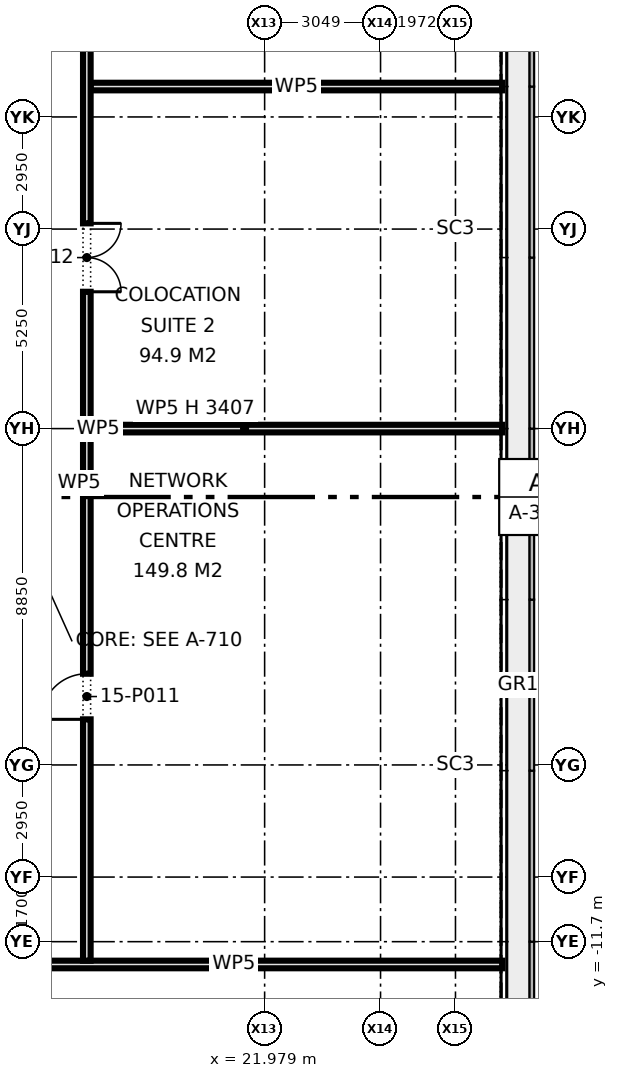
"""IFC4 building model, lengths in metres.
Left out: names, types, materials, properties, quantities, classifications, styles, units other than length and angle.
Written with IfcOpenShell. Run it as: python <this file> out.ifc"""

import sys

from ifc_helpers import new_model, si_unit, direction, frame, frame_2d, origin, origin_2d, place, context, subcontext, project, spatial, rectangle, i_section, extrude, element, fill, save


model = new_model("IFC4")
c1 = context("Model", 3, precision=1e-05, world=origin(), true_north=direction((0.0, 1.0)))
c2 = subcontext(c1, "Body", "Model", "MODEL_VIEW")
j1 = project(units=[si_unit("LENGTHUNIT", "METRE"), si_unit("PLANEANGLEUNIT", "RADIAN")], contexts=[c1])
p1 = place(None, origin())
s1 = spatial("IfcSite", under=j1, at=p1, CompositionType="ELEMENT")
p2 = place(p1, origin())
s2 = spatial("IfcBuilding", under=s1, at=p2, CompositionType="ELEMENT")
p3 = place(p2, frame((0.0, 0.0, 68.6)))
s3 = spatial("IfcBuildingStorey", under=s2, at=p3, CompositionType="ELEMENT", Elevation=68.6)
for number, where, z_axis, x_axis in (
    (1, (27.0, -7.05, 0.0), (0.0, 0.0, 1.0), (0.0, 1.0, 0.0)),
    (2, (27.0, 7.05, 0.0), (0.0, 0.0, 1.0), (0.0, 1.0, 0.0)),
):
    element("IfcColumn", number, at=place(p3, frame(where, z_axis=z_axis, x_axis=x_axis)), inside=s3, PredefinedType="COLUMN", context=c2, shape_type="SweptSolid", body=[
        extrude(i_section(OverallWidth=0.442, OverallDepth=0.531, WebThickness=0.066, FlangeThickness=0.106, FilletRadius=0.015, at=origin_2d()), origin(), (0.0, 0.0, 1.0), 3.407),
    ])
p4 = place(p3, frame((-20.33, -12.3, 0.0), z_axis=(0.0, 0.0, 1.0), x_axis=(1.0, 0.0, 0.0)))
e3 = element("IfcWall", 3, at=p4, inside=s3, PredefinedType="PARTITIONING", context=c2, shape_type="SweptSolid", body=[
    extrude(rectangle(XDim=48.56, YDim=0.2, at=frame_2d((24.28, 0.0))), origin(), (0.0, 0.0, 1.0), 4.4),
])
p5 = place(p4, frame((5.64, 0.0, 0.0)))
e4 = element("IfcOpeningElement", 4, at=p5, cuts=e3, PredefinedType="OPENING", context=c2, shape_type="SweptSolid", body=[
    extrude(rectangle(XDim=1.8, YDim=2.1, at=frame_2d((0.9, 1.05))), frame((0.0, 0.11, 0.0), z_axis=(0.0, -1.0, 0.0), x_axis=(1.0, 0.0, 0.0)), (0.0, 0.0, 1.0), 0.22),
])
p6 = place(p4, frame((16.93, 0.0, 0.0)))
e5 = element("IfcOpeningElement", 5, at=p6, cuts=e3, PredefinedType="OPENING", context=c2, shape_type="SweptSolid", body=[
    extrude(rectangle(XDim=1.2, YDim=2.1, at=frame_2d((0.6, 1.05))), frame((0.0, 0.11, 0.0), z_axis=(0.0, -1.0, 0.0), x_axis=(1.0, 0.0, 0.0)), (0.0, 0.0, 1.0), 0.22),
])
p7 = place(p4, frame((33.035, 0.0, 0.0)))
e6 = element("IfcOpeningElement", 6, at=p7, cuts=e3, PredefinedType="OPENING", context=c2, shape_type="SweptSolid", body=[
    extrude(rectangle(XDim=1.8, YDim=2.1, at=frame_2d((0.9, 1.05))), frame((0.0, 0.11, 0.0), z_axis=(0.0, -1.0, 0.0), x_axis=(1.0, 0.0, 0.0)), (0.0, 0.0, 1.0), 0.22),
])
p8 = place(p4, frame((23.03, 0.0, 0.0)))
e7 = element("IfcOpeningElement", 7, at=p8, cuts=e3, PredefinedType="OPENING", context=c2, shape_type="SweptSolid", body=[
    extrude(rectangle(XDim=1.0, YDim=2.1, at=frame_2d((0.5, 1.05))), frame((0.0, 0.11, 0.0), z_axis=(0.0, -1.0, 0.0), x_axis=(1.0, 0.0, 0.0)), (0.0, 0.0, 1.0), 0.22),
])
p9 = place(p4, frame((26.03, 0.0, 0.0)))
e8 = element("IfcOpeningElement", 8, at=p9, cuts=e3, PredefinedType="OPENING", context=c2, shape_type="SweptSolid", body=[
    extrude(rectangle(XDim=1.0, YDim=2.1, at=frame_2d((0.5, 1.05))), frame((0.0, 0.11, 0.0), z_axis=(0.0, -1.0, 0.0), x_axis=(1.0, 0.0, 0.0)), (0.0, 0.0, 1.0), 0.22),
])
p10 = place(p4, frame((28.63, 0.0, 0.0)))
e9 = element("IfcOpeningElement", 9, at=p10, cuts=e3, PredefinedType="OPENING", context=c2, shape_type="SweptSolid", body=[
    extrude(rectangle(XDim=1.0, YDim=2.1, at=frame_2d((0.5, 1.05))), frame((0.0, 0.11, 0.0), z_axis=(0.0, -1.0, 0.0), x_axis=(1.0, 0.0, 0.0)), (0.0, 0.0, 1.0), 0.22),
])
p11 = place(p3, frame((17.4, 1.8, 0.0), z_axis=(0.0, 0.0, 1.0), x_axis=(1.0, 0.0, 0.0)))
e10 = element("IfcWall", 10, at=p11, inside=s3, PredefinedType="PARTITIONING", context=c2, shape_type="SweptSolid", body=[
    extrude(rectangle(XDim=0.4, YDim=0.2, at=frame_2d((0.2, 0.0))), origin(), (0.0, 0.0, 1.0), 4.4),
])
p12 = place(p3, frame((17.8, 1.8, 0.0), z_axis=(0.0, 0.0, 1.0), x_axis=(1.0, 0.0, 0.0)))
e11 = element("IfcWall", 11, at=p12, inside=s3, PredefinedType="PARTITIONING", context=c2, shape_type="SweptSolid", body=[
    extrude(rectangle(XDim=10.43, YDim=0.2, at=frame_2d((5.215, 0.0))), origin(), (0.0, 0.0, 1.0), 3.407),
])
p13 = place(p3, frame((17.4, 10.8, 0.0), z_axis=(0.0, 0.0, 1.0), x_axis=(1.0, 0.0, 0.0)))
e12 = element("IfcWall", 12, at=p13, inside=s3, PredefinedType="PARTITIONING", context=c2, shape_type="SweptSolid", body=[
    extrude(rectangle(XDim=10.83, YDim=0.2, at=frame_2d((5.415, 0.0))), origin(), (0.0, 0.0, 1.0), 4.4),
])
p14 = place(p3, frame((17.3, -12.2, 0.0), z_axis=(0.0, 0.0, 1.0), x_axis=(0.0, 1.0, 0.0)))
e13 = element("IfcWall", 13, at=p14, inside=s3, PredefinedType="PARTITIONING", context=c2, shape_type="SweptSolid", body=[
    extrude(rectangle(XDim=24.4, YDim=0.2, at=frame_2d((12.2, 0.0))), origin(), (0.0, 0.0, 1.0), 4.4),
])
p15 = place(p14, frame((6.35, 0.0, 0.0)))
e14 = element("IfcOpeningElement", 14, at=p15, cuts=e13, PredefinedType="OPENING", context=c2, shape_type="SweptSolid", body=[
    extrude(rectangle(XDim=1.2, YDim=2.1, at=frame_2d((0.6, 1.05))), frame((0.0, 0.11, 0.0), z_axis=(0.0, -1.0, 0.0), x_axis=(1.0, 0.0, 0.0)), (0.0, 0.0, 1.0), 0.22),
])
p16 = place(p14, frame((17.6, 0.0, 0.0)))
e15 = element("IfcOpeningElement", 15, at=p16, cuts=e13, PredefinedType="OPENING", context=c2, shape_type="SweptSolid", body=[
    extrude(rectangle(XDim=1.8, YDim=2.1, at=frame_2d((0.9, 1.05))), frame((0.0, 0.11, 0.0), z_axis=(0.0, -1.0, 0.0), x_axis=(1.0, 0.0, 0.0)), (0.0, 0.0, 1.0), 0.22),
])
p17 = place(p15, origin())
e16 = element("IfcDoor", 16, at=p17, inside=s3, OperationType="SINGLE_SWING_LEFT", PredefinedType="DOOR", context=c2, shape_type="SweptSolid", body=[
    extrude(rectangle(XDim=1.2, YDim=2.1, at=frame_2d((0.6, 1.05))), frame((0.0, 0.025, 0.0), z_axis=(0.0, -1.0, 0.0), x_axis=(1.0, 0.0, 0.0)), (0.0, 0.0, 1.0), 0.05),
])
fill(e14, e16)
p18 = place(p16, frame((1.8, 0.0, 0.0), z_axis=(0.0, 0.0, 1.0), x_axis=(-1.0, 0.0, 0.0)))
e17 = element("IfcDoor", 17, at=p18, inside=s3, OperationType="DOUBLE_DOOR_SINGLE_SWING", PredefinedType="DOOR", context=c2, shape_type="SweptSolid", body=[
    extrude(rectangle(XDim=1.8, YDim=2.1, at=frame_2d((0.9, 1.05))), frame((0.0, 0.025, 0.0), z_axis=(0.0, -1.0, 0.0), x_axis=(1.0, 0.0, 0.0)), (0.0, 0.0, 1.0), 0.05),
])
fill(e15, e17)
save(model, sys.argv[1])
